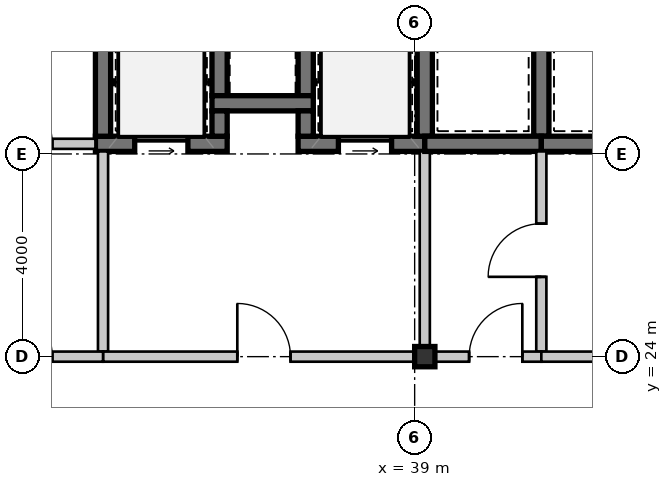
"""IFC4 building model, lengths in metres.
Left out: names, types, materials, properties, quantities, classifications, styles, units other than length and angle.
Written with IfcOpenShell. Run it as: python <this file> out.ifc"""

import sys

from ifc_helpers import new_model, si_unit, direction, frame, frame_2d, origin, origin_2d, place, context, subcontext, project, spatial, rectangle, hollow_rectangle, extrude, source, transform, mapped, element, fill, save


model = new_model("IFC4")
c1 = context("Model", 3, precision=1e-05, world=origin(), true_north=direction((0.0, 1.0)))
c2 = subcontext(c1, "Body", "Model", "MODEL_VIEW")
j1 = project(units=[si_unit("LENGTHUNIT", "METRE"), si_unit("PLANEANGLEUNIT", "RADIAN")], contexts=[c1])
p1 = place(None, origin())
s1 = spatial("IfcSite", under=j1, at=p1, CompositionType="ELEMENT")
p2 = place(p1, origin())
s2 = spatial("IfcBuilding", under=s1, at=p2, CompositionType="ELEMENT")
p3 = place(p2, frame((0.0, 0.0, 139.3)))
s3 = spatial("IfcBuildingStorey", under=s2, at=p3, CompositionType="ELEMENT", Elevation=139.3)
m1 = source(origin(), c2, "Body", "SweptSolid", [
    extrude(hollow_rectangle(XDim=0.4, YDim=0.4, WallThickness=0.016, at=origin_2d()), origin(), (0.0, 0.0, 1.0), 3.15),
])
p4 = place(p3, frame((39.2, 24.0, 0.0), z_axis=(0.0, 0.0, 1.0), x_axis=(1.0, 0.0, 0.0)))
e1 = element("IfcColumn", 1, at=p4, inside=s3, PredefinedType="COLUMN", context=c2, shape_type="MappedRepresentation", body=[
    mapped(m1, transform((0.0, 0.0, 0.0), scale=1.0)),
])
m2 = source(origin(), c2, "Body", "SweptSolid", [
    extrude(rectangle(XDim=1.2, YDim=0.3, at=frame_2d((0.6, 0.0))), origin(), (0.0, 0.0, 1.0), 2.93),
])
for number, where, z_axis, x_axis in (
    (2, (35.15, 30.35, 0.0), (0.0, 0.0, 1.0), (0.0, -1.0, 0.0)),
    (3, (36.85, 29.15, 0.0), (0.0, 0.0, 1.0), (0.0, 1.0, 0.0)),
):
    element("IfcWall", number, at=place(p3, frame(where, z_axis=z_axis, x_axis=x_axis)), inside=s3, PredefinedType="SHEAR", context=c2, shape_type="MappedRepresentation", body=[
        mapped(m2, transform((0.0, 0.0, 0.0), scale=1.0)),
    ])
m3 = source(origin(), c2, "Body", "SweptSolid", [
    extrude(rectangle(XDim=2.0, YDim=0.3, at=frame_2d((1.0, 0.0))), origin(), (0.0, 0.0, 1.0), 2.93),
])
p5 = place(p3, frame((35.0, 29.0, 0.0), z_axis=(0.0, 0.0, 1.0), x_axis=(1.0, 0.0, 0.0)))
e4 = element("IfcWall", 4, at=p5, inside=s3, PredefinedType="SHEAR", context=c2, shape_type="MappedRepresentation", body=[
    mapped(m3, transform((0.0, 0.0, 0.0), scale=1.0)),
])
m4 = source(origin(), c2, "Body", "SweptSolid", [
    extrude(rectangle(XDim=2.6, YDim=0.3, at=frame_2d((1.3, 0.0))), origin(), (0.0, 0.0, 1.0), 2.93),
])
p6 = place(p3, frame((32.7, 28.2, 0.0), z_axis=(0.0, 0.0, 1.0), x_axis=(1.0, 0.0, 0.0)))
e5 = element("IfcWall", 5, at=p6, inside=s3, PredefinedType="SHEAR", context=c2, shape_type="MappedRepresentation", body=[
    mapped(m4, transform((0.0, 0.0, 0.0), scale=1.0)),
])
m5 = source(origin(), c2, "Body", "SweptSolid", [
    extrude(rectangle(XDim=1.05, YDim=2.15, at=frame_2d((0.525, 1.075))), frame((0.0, 0.16, 0.0), z_axis=(0.0, -1.0, 0.0), x_axis=(1.0, 0.0, 0.0)), (0.0, 0.0, 1.0), 0.32),
])
p7 = place(p6, frame((0.775, 0.0, 0.0)))
e6 = element("IfcOpeningElement", 6, at=p7, cuts=e5, PredefinedType="OPENING", context=c2, shape_type="MappedRepresentation", body=[
    mapped(m5, transform((0.0, 0.0, 0.0), scale=1.0)),
])
m6 = source(origin(), c2, "Body", "SweptSolid", [
    extrude(rectangle(XDim=0.5, YDim=0.3, at=frame_2d((0.25, 0.0))), origin(), (0.0, 0.0, 1.0), 2.93),
])
p8 = place(p3, frame((35.15, 28.35, 0.0), z_axis=(0.0, 0.0, 1.0), x_axis=(0.0, 1.0, 0.0)))
e7 = element("IfcWall", 7, at=p8, inside=s3, PredefinedType="SHEAR", context=c2, shape_type="MappedRepresentation", body=[
    mapped(m6, transform((0.0, 0.0, 0.0), scale=1.0)),
])
m7 = source(origin(), c2, "Body", "SweptSolid", [
    extrude(rectangle(XDim=3.5, YDim=0.3, at=frame_2d((1.75, 0.0))), origin(), (0.0, 0.0, 1.0), 2.93),
])
p9 = place(p3, frame((32.85, 31.85, 0.0), z_axis=(0.0, 0.0, 1.0), x_axis=(0.0, -1.0, 0.0)))
e8 = element("IfcWall", 8, at=p9, inside=s3, PredefinedType="SHEAR", context=c2, shape_type="MappedRepresentation", body=[
    mapped(m7, transform((0.0, 0.0, 0.0), scale=1.0)),
])
m8 = source(origin(), c2, "Body", "SweptSolid", [
    extrude(rectangle(XDim=2.5, YDim=0.3, at=frame_2d((1.25, 0.0))), origin(), (0.0, 0.0, 1.0), 2.93),
])
p10 = place(p3, frame((36.7, 28.2, 0.0), z_axis=(0.0, 0.0, 1.0), x_axis=(1.0, 0.0, 0.0)))
e9 = element("IfcWall", 9, at=p10, inside=s3, PredefinedType="SHEAR", context=c2, shape_type="MappedRepresentation", body=[
    mapped(m8, transform((0.0, 0.0, 0.0), scale=1.0)),
])
p11 = place(p10, frame((0.795, 0.0, 0.0)))
e10 = element("IfcOpeningElement", 10, at=p11, cuts=e9, PredefinedType="OPENING", context=c2, shape_type="MappedRepresentation", body=[
    mapped(m5, transform((0.0, 0.0, 0.0), scale=1.0)),
])
p12 = place(p3, frame((36.85, 28.85, 0.0), z_axis=(0.0, 0.0, 1.0), x_axis=(0.0, -1.0, 0.0)))
e11 = element("IfcWall", 11, at=p12, inside=s3, PredefinedType="SHEAR", context=c2, shape_type="MappedRepresentation", body=[
    mapped(m6, transform((0.0, 0.0, 0.0), scale=1.0)),
])
p13 = place(p3, frame((39.2, 28.35, 0.0), z_axis=(0.0, 0.0, 1.0), x_axis=(0.0, 1.0, 0.0)))
e12 = element("IfcWall", 12, at=p13, inside=s3, PredefinedType="SHEAR", context=c2, shape_type="MappedRepresentation", body=[
    mapped(m7, transform((0.0, 0.0, 0.0), scale=1.0)),
])
m9 = source(origin(), c2, "Body", "SweptSolid", [
    extrude(rectangle(XDim=3.95, YDim=0.2, at=frame_2d((1.975, 0.0))), origin(), (0.0, 0.0, 1.0), 2.93),
])
p14 = place(p3, frame((32.85, 24.1, 0.0), z_axis=(0.0, 0.0, 1.0), x_axis=(0.0, 1.0, 0.0)))
e13 = element("IfcWall", 13, at=p14, inside=s3, PredefinedType="SOLIDWALL", context=c2, shape_type="MappedRepresentation", body=[
    mapped(m9, transform((0.0, 0.0, 0.0), scale=1.0)),
])
m10 = source(origin(), c2, "Body", "SweptSolid", [
    extrude(rectangle(XDim=3.95, YDim=0.2, at=frame_2d((1.975, 0.0))), origin(), (0.0, 0.0, 1.0), 2.47),
])
p15 = place(p3, frame((39.2, 28.05, 0.0), z_axis=(0.0, 0.0, 1.0), x_axis=(0.0, -1.0, 0.0)))
e14 = element("IfcWall", 14, at=p15, inside=s3, PredefinedType="SOLIDWALL", context=c2, shape_type="MappedRepresentation", body=[
    mapped(m10, transform((0.0, 0.0, 0.0), scale=1.0)),
])
m11 = source(origin(), c2, "Body", "SweptSolid", [
    extrude(rectangle(XDim=6.35, YDim=0.2, at=frame_2d((3.175, 0.0))), origin(), (0.0, 0.0, 1.0), 2.47),
])
p16 = place(p3, frame((39.2, 24.0, 0.0), z_axis=(0.0, 0.0, 1.0), x_axis=(-1.0, 0.0, 0.0)))
e15 = element("IfcWall", 15, at=p16, inside=s3, PredefinedType="SOLIDWALL", context=c2, shape_type="MappedRepresentation", body=[
    mapped(m11, transform((0.0, 0.0, 0.0), scale=1.0)),
])
m12 = source(origin(), c2, "Body", "SweptSolid", [
    extrude(rectangle(XDim=1.05, YDim=2.1, at=frame_2d((0.525, 1.05))), frame((0.0, 0.11, 0.0), z_axis=(0.0, -1.0, 0.0), x_axis=(1.0, 0.0, 0.0)), (0.0, 0.0, 1.0), 0.22),
])
p17 = place(p16, frame((2.65, 0.0, 0.0)))
e16 = element("IfcOpeningElement", 16, at=p17, cuts=e15, PredefinedType="OPENING", context=c2, shape_type="MappedRepresentation", body=[
    mapped(m12, transform((0.0, 0.0, 0.0), scale=1.0)),
])
p18 = place(p3, frame((41.5, 28.35, 0.0), z_axis=(0.0, 0.0, 1.0), x_axis=(0.0, 1.0, 0.0)))
e17 = element("IfcWall", 17, at=p18, inside=s3, PredefinedType="SHEAR", context=c2, shape_type="MappedRepresentation", body=[
    mapped(m7, transform((0.0, 0.0, 0.0), scale=1.0)),
])
m13 = source(origin(), c2, "Body", "SweptSolid", [
    extrude(rectangle(XDim=2.3, YDim=0.3, at=frame_2d((1.15, 0.0))), origin(), (0.0, 0.0, 1.0), 2.93),
])
p19 = place(p3, frame((39.2, 28.2, 0.0), z_axis=(0.0, 0.0, 1.0), x_axis=(1.0, 0.0, 0.0)))
e18 = element("IfcWall", 18, at=p19, inside=s3, PredefinedType="SHEAR", context=c2, shape_type="MappedRepresentation", body=[
    mapped(m13, transform((0.0, 0.0, 0.0), scale=1.0)),
])
m14 = source(origin(), c2, "Body", "SweptSolid", [
    extrude(rectangle(XDim=2.07, YDim=0.3, at=frame_2d((1.035, 0.0))), origin(), (0.0, 0.0, 1.0), 2.93),
])
p20 = place(p3, frame((41.5, 28.2, 0.0), z_axis=(0.0, 0.0, 1.0), x_axis=(1.0, 0.0, 0.0)))
e19 = element("IfcWall", 19, at=p20, inside=s3, PredefinedType="SHEAR", context=c2, shape_type="MappedRepresentation", body=[
    mapped(m14, transform((0.0, 0.0, 0.0), scale=1.0)),
])
m15 = source(origin(), c2, "Body", "SweptSolid", [
    extrude(rectangle(XDim=2.9, YDim=0.2, at=frame_2d((1.45, 0.0))), origin(), (0.0, 0.0, 1.0), 2.93),
])
p21 = place(p3, frame((29.8, 28.2, 0.0), z_axis=(0.0, 0.0, 1.0), x_axis=(1.0, 0.0, 0.0)))
e20 = element("IfcWall", 20, at=p21, inside=s3, PredefinedType="SOLIDWALL", context=c2, shape_type="MappedRepresentation", body=[
    mapped(m15, transform((0.0, 0.0, 0.0), scale=1.0)),
])
p22 = place(p21, frame((1.0, 0.0, 0.0)))
e21 = element("IfcOpeningElement", 21, at=p22, cuts=e20, PredefinedType="OPENING", context=c2, shape_type="MappedRepresentation", body=[
    mapped(m12, transform((0.0, 0.0, 0.0), scale=1.0)),
])
m16 = source(origin(), c2, "Body", "SweptSolid", [
    extrude(rectangle(XDim=3.05, YDim=0.2, at=frame_2d((1.525, 0.0))), origin(), (0.0, 0.0, 1.0), 2.47),
])
p23 = place(p3, frame((32.85, 24.0, 0.0), z_axis=(0.0, 0.0, 1.0), x_axis=(-1.0, 0.0, 0.0)))
e22 = element("IfcWall", 22, at=p23, inside=s3, PredefinedType="SOLIDWALL", context=c2, shape_type="MappedRepresentation", body=[
    mapped(m16, transform((0.0, 0.0, 0.0), scale=1.0)),
])
p24 = place(p23, frame((1.0, 0.0, 0.0)))
e23 = element("IfcOpeningElement", 23, at=p24, cuts=e22, PredefinedType="OPENING", context=c2, shape_type="MappedRepresentation", body=[
    mapped(m12, transform((0.0, 0.0, 0.0), scale=1.0)),
])
p25 = place(p3, frame((41.5, 28.05, 0.0), z_axis=(0.0, 0.0, 1.0), x_axis=(0.0, -1.0, 0.0)))
e24 = element("IfcWall", 24, at=p25, inside=s3, PredefinedType="SOLIDWALL", context=c2, shape_type="MappedRepresentation", body=[
    mapped(m9, transform((0.0, 0.0, 0.0), scale=1.0)),
])
p26 = place(p25, frame((1.425, 0.0, 0.0)))
e25 = element("IfcOpeningElement", 25, at=p26, cuts=e24, PredefinedType="OPENING", context=c2, shape_type="MappedRepresentation", body=[
    mapped(m12, transform((0.0, 0.0, 0.0), scale=1.0)),
])
m17 = source(origin(), c2, "Body", "SweptSolid", [
    extrude(rectangle(XDim=2.3, YDim=0.2, at=frame_2d((1.15, 0.0))), origin(), (0.0, 0.0, 1.0), 2.397),
])
p27 = place(p3, frame((41.5, 24.0, 0.0), z_axis=(0.0, 0.0, 1.0), x_axis=(-1.0, 0.0, 0.0)))
e26 = element("IfcWall", 26, at=p27, inside=s3, PredefinedType="SOLIDWALL", context=c2, shape_type="MappedRepresentation", body=[
    mapped(m17, transform((0.0, 0.0, 0.0), scale=1.0)),
])
p28 = place(p27, frame((0.375, 0.0, 0.0)))
e27 = element("IfcOpeningElement", 27, at=p28, cuts=e26, PredefinedType="OPENING", context=c2, shape_type="MappedRepresentation", body=[
    mapped(m12, transform((0.0, 0.0, 0.0), scale=1.0)),
])
m18 = source(origin(), c2, "Body", "SweptSolid", [
    extrude(rectangle(XDim=2.05, YDim=0.2, at=frame_2d((1.025, 0.0))), origin(), (0.0, 0.0, 1.0), 2.397),
])
p29 = place(p3, frame((43.55, 24.0, 0.0), z_axis=(0.0, 0.0, 1.0), x_axis=(-1.0, 0.0, 0.0)))
e28 = element("IfcWall", 28, at=p29, inside=s3, PredefinedType="SOLIDWALL", context=c2, shape_type="MappedRepresentation", body=[
    mapped(m18, transform((0.0, 0.0, 0.0), scale=1.0)),
])
m19 = source(origin(), c2, "Body", "SweptSolid", [
    extrude(rectangle(XDim=1.05, YDim=2.15, at=frame_2d((0.525, 1.075))), frame((0.0, 0.025, 0.0), z_axis=(0.0, -1.0, 0.0), x_axis=(1.0, 0.0, 0.0)), (0.0, 0.0, 1.0), 0.05),
])
p30 = place(p7, origin())
e29 = element("IfcDoor", 29, at=p30, inside=s3, OperationType="SLIDING_TO_LEFT", PredefinedType="DOOR", context=c2, shape_type="MappedRepresentation", body=[
    mapped(m19, transform((0.0, 0.0, 0.0), scale=1.0)),
])
fill(e6, e29)
p31 = place(p11, origin())
e30 = element("IfcDoor", 30, at=p31, inside=s3, OperationType="SLIDING_TO_LEFT", PredefinedType="DOOR", context=c2, shape_type="MappedRepresentation", body=[
    mapped(m19, transform((0.0, 0.0, 0.0), scale=1.0)),
])
fill(e10, e30)
m20 = source(origin(), c2, "Body", "SweptSolid", [
    extrude(rectangle(XDim=1.05, YDim=2.1, at=frame_2d((0.525, 1.05))), frame((0.0, 0.025, 0.0), z_axis=(0.0, -1.0, 0.0), x_axis=(1.0, 0.0, 0.0)), (0.0, 0.0, 1.0), 0.05),
])
p32 = place(p17, frame((1.05, 0.0, 0.0), z_axis=(0.0, 0.0, 1.0), x_axis=(-1.0, 0.0, 0.0)))
e31 = element("IfcDoor", 31, at=p32, inside=s3, OperationType="SINGLE_SWING_LEFT", PredefinedType="DOOR", context=c2, shape_type="MappedRepresentation", body=[
    mapped(m20, transform((0.0, 0.0, 0.0), scale=1.0)),
])
fill(e16, e31)
p33 = place(p26, frame((1.05, 0.0, 0.0), z_axis=(0.0, 0.0, 1.0), x_axis=(-1.0, 0.0, 0.0)))
e32 = element("IfcDoor", 32, at=p33, inside=s3, OperationType="SINGLE_SWING_LEFT", PredefinedType="DOOR", context=c2, shape_type="MappedRepresentation", body=[
    mapped(m20, transform((0.0, 0.0, 0.0), scale=1.0)),
])
fill(e25, e32)
p34 = place(p28, frame((1.05, 0.0, 0.0), z_axis=(0.0, 0.0, 1.0), x_axis=(-1.0, 0.0, 0.0)))
e33 = element("IfcDoor", 33, at=p34, inside=s3, OperationType="SINGLE_SWING_RIGHT", PredefinedType="DOOR", context=c2, shape_type="MappedRepresentation", body=[
    mapped(m20, transform((0.0, 0.0, 0.0), scale=1.0)),
])
fill(e27, e33)
save(model, sys.argv[1])
